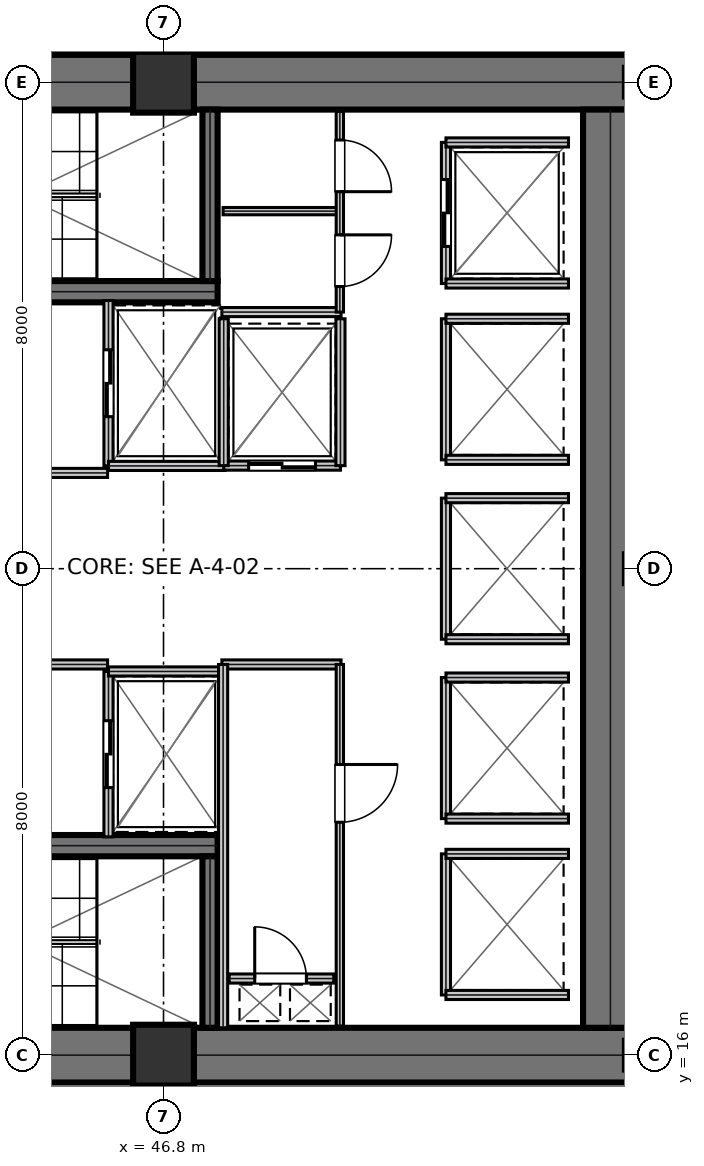
"""IFC4 building model, lengths in metres.
Left out: names, types, materials, properties, quantities, classifications, styles, units other than length and angle.
Written with IfcOpenShell. Run it as: python <this file> out.ifc"""

import sys

from ifc_helpers import new_model, si_unit, direction, frame, frame_2d, origin, origin_2d, place, context, subcontext, project, spatial, rectangle, extrude, element, fill, save


model = new_model("IFC4")
c1 = context("Model", 3, precision=1e-05, world=origin(), true_north=direction((0.0, 1.0)))
c2 = subcontext(c1, "Body", "Model", "MODEL_VIEW")
j1 = project(units=[si_unit("LENGTHUNIT", "METRE"), si_unit("PLANEANGLEUNIT", "RADIAN")], contexts=[c1])
p1 = place(None, origin())
s1 = spatial("IfcSite", under=j1, at=p1, CompositionType="ELEMENT")
p2 = place(p1, origin())
s2 = spatial("IfcBuilding", under=s1, at=p2, CompositionType="ELEMENT")
p3 = place(p2, frame((0.0, 0.0, 5.4)))
s3 = spatial("IfcBuildingStorey", under=s2, at=p3, CompositionType="ELEMENT", Elevation=5.4)
for number, where, z_axis, x_axis in (
    (1, (38.8, 32.0, 0.0), (0.0, 0.0, 1.0), (1.0, 0.0, 0.0)),
    (2, (38.8, 16.0, 0.0), (0.0, 0.0, 1.0), (1.0, 0.0, 0.0)),
):
    element("IfcWall", number, at=place(p3, frame(where, z_axis=z_axis, x_axis=x_axis)), inside=s3, PredefinedType="SHEAR", context=c2, shape_type="SweptSolid", body=[
        extrude(rectangle(XDim=16.0, YDim=0.9, at=frame_2d((8.0, 0.0))), origin(), (0.0, 0.0, 1.0), 5.12),
    ])
p4 = place(p3, frame((54.15, 16.45, 0.0), z_axis=(0.0, 0.0, 1.0), x_axis=(0.0, 1.0, 0.0)))
e3 = element("IfcWall", 3, at=p4, inside=s3, PredefinedType="SHEAR", context=c2, shape_type="SweptSolid", body=[
    extrude(rectangle(XDim=15.1, YDim=0.9, at=frame_2d((7.55, 0.0))), origin(), (0.0, 0.0, 1.0), 5.12),
])
p5 = place(p3, frame((39.98, 28.555, 0.0), z_axis=(0.0, 0.0, 1.0), x_axis=(1.0, 0.0, 0.0)))
e4 = element("IfcWall", 4, at=p5, inside=s3, PredefinedType="SHEAR", context=c2, shape_type="SweptSolid", body=[
    extrude(rectangle(XDim=7.71, YDim=0.35, at=frame_2d((3.855, 0.0))), origin(), (0.0, 0.0, 1.0), 5.12),
])
p6 = place(p5, frame((0.25, 0.0, 0.0)))
e5 = element("IfcOpeningElement", 5, at=p6, cuts=e4, PredefinedType="OPENING", context=c2, shape_type="SweptSolid", body=[
    extrude(rectangle(XDim=1.1, YDim=2.15, at=frame_2d((0.55, 1.075))), frame((0.0, 0.185, 0.0), z_axis=(0.0, -1.0, 0.0), x_axis=(1.0, 0.0, 0.0)), (0.0, 0.0, 1.0), 0.37),
])
p7 = place(p3, frame((39.98, 19.445, 0.0), z_axis=(0.0, 0.0, 1.0), x_axis=(1.0, 0.0, 0.0)))
e6 = element("IfcWall", 6, at=p7, inside=s3, PredefinedType="SHEAR", context=c2, shape_type="SweptSolid", body=[
    extrude(rectangle(XDim=7.71, YDim=0.35, at=frame_2d((3.855, 0.0))), origin(), (0.0, 0.0, 1.0), 5.12),
])
p8 = place(p7, frame((0.25, 0.0, 0.0)))
e7 = element("IfcOpeningElement", 7, at=p8, cuts=e6, PredefinedType="OPENING", context=c2, shape_type="SweptSolid", body=[
    extrude(rectangle(XDim=1.1, YDim=2.15, at=frame_2d((0.55, 1.075))), frame((0.0, 0.185, 0.0), z_axis=(0.0, -1.0, 0.0), x_axis=(1.0, 0.0, 0.0)), (0.0, 0.0, 1.0), 0.37),
])
for number, where, z_axis, x_axis in (
    (8, (47.565, 28.73, 0.0), (0.0, 0.0, 1.0), (0.0, 1.0, 0.0)),
    (9, (47.565, 16.45, 0.0), (0.0, 0.0, 1.0), (0.0, 1.0, 0.0)),
):
    element("IfcWall", number, at=place(p3, frame(where, z_axis=z_axis, x_axis=x_axis)), inside=s3, PredefinedType="SHEAR", context=c2, shape_type="SweptSolid", body=[
        extrude(rectangle(XDim=2.82, YDim=0.25, at=frame_2d((1.41, 0.0))), origin(), (0.0, 0.0, 1.0), 5.12),
    ])
for number, where, z_axis, x_axis in (
    (10, (46.8, 16.0, 0.0), (0.0, 0.0, 1.0), (1.0, 0.0, 0.0)),
    (11, (46.8, 32.0, 0.0), (0.0, 0.0, 1.0), (1.0, 0.0, 0.0)),
):
    element("IfcColumn", number, at=place(p3, frame(where, z_axis=z_axis, x_axis=x_axis)), inside=s3, PredefinedType="COLUMN", context=c2, shape_type="SweptSolid", body=[
        extrude(rectangle(XDim=1.0, YDim=1.0, at=origin_2d()), origin(), (0.0, 0.0, 1.0), 5.395),
    ])
p9 = place(p3, frame((39.98, 25.575, 0.0), z_axis=(0.0, 0.0, 1.0), x_axis=(1.0, 0.0, 0.0)))
e12 = element("IfcWall", 12, at=p9, inside=s3, PredefinedType="PARTITIONING", context=c2, shape_type="SweptSolid", body=[
    extrude(rectangle(XDim=5.9, YDim=0.15, at=frame_2d((2.95, 0.0))), origin(), (0.0, 0.0, 1.0), 5.12),
])
p10 = place(p9, frame((2.35, 0.0, 0.0)))
e13 = element("IfcOpeningElement", 13, at=p10, cuts=e12, PredefinedType="OPENING", context=c2, shape_type="SweptSolid", body=[
    extrude(rectangle(XDim=1.05, YDim=2.15, at=frame_2d((0.525, 1.075))), frame((0.0, 0.085, 0.0), z_axis=(0.0, -1.0, 0.0), x_axis=(1.0, 0.0, 0.0)), (0.0, 0.0, 1.0), 0.17),
])
p11 = place(p3, frame((39.98, 22.425, 0.0), z_axis=(0.0, 0.0, 1.0), x_axis=(1.0, 0.0, 0.0)))
e14 = element("IfcWall", 14, at=p11, inside=s3, PredefinedType="PARTITIONING", context=c2, shape_type="SweptSolid", body=[
    extrude(rectangle(XDim=5.9, YDim=0.15, at=frame_2d((2.95, 0.0))), origin(), (0.0, 0.0, 1.0), 5.12),
])
p12 = place(p11, frame((2.35, 0.0, 0.0)))
e15 = element("IfcOpeningElement", 15, at=p12, cuts=e14, PredefinedType="OPENING", context=c2, shape_type="SweptSolid", body=[
    extrude(rectangle(XDim=1.05, YDim=2.15, at=frame_2d((0.525, 1.075))), frame((0.0, 0.085, 0.0), z_axis=(0.0, -1.0, 0.0), x_axis=(1.0, 0.0, 0.0)), (0.0, 0.0, 1.0), 0.17),
])
p13 = place(p3, frame((45.895, 25.69, 0.0), z_axis=(0.0, 0.0, 1.0), x_axis=(0.0, 1.0, 0.0)))
e16 = element("IfcWall", 16, at=p13, inside=s3, PredefinedType="PARTITIONING", context=c2, shape_type="SweptSolid", body=[
    extrude(rectangle(XDim=2.72, YDim=0.15, at=frame_2d((1.36, 0.0))), origin(), (0.0, 0.0, 1.0), 5.12),
])
p14 = place(p13, frame((0.81, 0.0, 0.0)))
e17 = element("IfcOpeningElement", 17, at=p14, cuts=e16, PredefinedType="OPENING", context=c2, shape_type="SweptSolid", body=[
    extrude(rectangle(XDim=1.1, YDim=2.15, at=frame_2d((0.55, 1.075))), frame((0.0, 0.085, 0.0), z_axis=(0.0, -1.0, 0.0), x_axis=(1.0, 0.0, 0.0)), (0.0, 0.0, 1.0), 0.17),
])
p15 = place(p3, frame((45.895, 25.69, 0.0), z_axis=(0.0, 0.0, 1.0), x_axis=(1.0, 0.0, 0.0)))
e18 = element("IfcWall", 18, at=p15, inside=s3, PredefinedType="PARTITIONING", context=c2, shape_type="SweptSolid", body=[
    extrude(rectangle(XDim=1.915, YDim=0.15, at=frame_2d((0.958, 0.0))), origin(), (0.0, 0.0, 1.0), 5.12),
])
p16 = place(p3, frame((45.895, 19.59, 0.0), z_axis=(0.0, 0.0, 1.0), x_axis=(0.0, 1.0, 0.0)))
e19 = element("IfcWall", 19, at=p16, inside=s3, PredefinedType="PARTITIONING", context=c2, shape_type="SweptSolid", body=[
    extrude(rectangle(XDim=2.72, YDim=0.15, at=frame_2d((1.36, 0.0))), origin(), (0.0, 0.0, 1.0), 5.12),
])
p17 = place(p16, frame((0.81, 0.0, 0.0)))
e20 = element("IfcOpeningElement", 20, at=p17, cuts=e19, PredefinedType="OPENING", context=c2, shape_type="SweptSolid", body=[
    extrude(rectangle(XDim=1.1, YDim=2.15, at=frame_2d((0.55, 1.075))), frame((0.0, 0.085, 0.0), z_axis=(0.0, -1.0, 0.0), x_axis=(1.0, 0.0, 0.0)), (0.0, 0.0, 1.0), 0.17),
])
p18 = place(p3, frame((45.895, 22.31, 0.0), z_axis=(0.0, 0.0, 1.0), x_axis=(1.0, 0.0, 0.0)))
e21 = element("IfcWall", 21, at=p18, inside=s3, PredefinedType="PARTITIONING", context=c2, shape_type="SweptSolid", body=[
    extrude(rectangle(XDim=1.915, YDim=0.15, at=frame_2d((0.958, 0.0))), origin(), (0.0, 0.0, 1.0), 5.12),
])
p19 = place(p3, frame((47.79, 25.695, 0.0), z_axis=(0.0, 0.0, 1.0), x_axis=(1.0, 0.0, 0.0)))
e22 = element("IfcWall", 22, at=p19, inside=s3, PredefinedType="PARTITIONING", context=c2, shape_type="SweptSolid", body=[
    extrude(rectangle(XDim=1.92, YDim=0.15, at=frame_2d((0.96, 0.0))), origin(), (0.0, 0.0, 1.0), 5.12),
])
p20 = place(p19, frame((0.41, 0.0, 0.0)))
e23 = element("IfcOpeningElement", 23, at=p20, cuts=e22, PredefinedType="OPENING", context=c2, shape_type="SweptSolid", body=[
    extrude(rectangle(XDim=1.1, YDim=2.15, at=frame_2d((0.55, 1.075))), frame((0.0, 0.085, 0.0), z_axis=(0.0, -1.0, 0.0), x_axis=(1.0, 0.0, 0.0)), (0.0, 0.0, 1.0), 0.17),
])
for number, where, z_axis, x_axis in (
    (24, (47.79, 25.695, 0.0), (0.0, 0.0, 1.0), (0.0, 1.0, 0.0)),
    (25, (49.71, 25.695, 0.0), (0.0, 0.0, 1.0), (0.0, 1.0, 0.0)),
):
    element("IfcWall", number, at=place(p3, frame(where, z_axis=z_axis, x_axis=x_axis)), inside=s3, PredefinedType="PARTITIONING", context=c2, shape_type="SweptSolid", body=[
        extrude(rectangle(XDim=2.415, YDim=0.15, at=frame_2d((1.208, 0.0))), origin(), (0.0, 0.0, 1.0), 5.12),
    ])
p21 = place(p3, frame((51.445, 28.69, 0.0), z_axis=(0.0, 0.0, 1.0), x_axis=(0.0, 1.0, 0.0)))
e26 = element("IfcWall", 26, at=p21, inside=s3, PredefinedType="PARTITIONING", context=c2, shape_type="SweptSolid", body=[
    extrude(rectangle(XDim=2.32, YDim=0.15, at=frame_2d((1.16, 0.0))), origin(), (0.0, 0.0, 1.0), 5.12),
])
p22 = place(p21, frame((0.61, 0.0, 0.0)))
e27 = element("IfcOpeningElement", 27, at=p22, cuts=e26, PredefinedType="OPENING", context=c2, shape_type="SweptSolid", body=[
    extrude(rectangle(XDim=1.1, YDim=2.15, at=frame_2d((0.55, 1.075))), frame((0.0, 0.085, 0.0), z_axis=(0.0, -1.0, 0.0), x_axis=(1.0, 0.0, 0.0)), (0.0, 0.0, 1.0), 0.17),
])
for number, where, z_axis, x_axis in (
    (28, (51.445, 28.69, 0.0), (0.0, 0.0, 1.0), (1.0, 0.0, 0.0)),
    (29, (51.445, 31.01, 0.0), (0.0, 0.0, 1.0), (1.0, 0.0, 0.0)),
):
    element("IfcWall", number, at=place(p3, frame(where, z_axis=z_axis, x_axis=x_axis)), inside=s3, PredefinedType="PARTITIONING", context=c2, shape_type="SweptSolid", body=[
        extrude(rectangle(XDim=2.015, YDim=0.15, at=frame_2d((1.007, 0.0))), origin(), (0.0, 0.0, 1.0), 5.12),
    ])
p23 = place(p3, frame((51.445, 25.79, 0.0), z_axis=(0.0, 0.0, 1.0), x_axis=(0.0, 1.0, 0.0)))
e30 = element("IfcWall", 30, at=p23, inside=s3, PredefinedType="PARTITIONING", context=c2, shape_type="SweptSolid", body=[
    extrude(rectangle(XDim=2.32, YDim=0.15, at=frame_2d((1.16, 0.0))), origin(), (0.0, 0.0, 1.0), 5.12),
])
for number, where, z_axis, x_axis in (
    (31, (51.445, 25.79, 0.0), (0.0, 0.0, 1.0), (1.0, 0.0, 0.0)),
    (32, (51.445, 28.11, 0.0), (0.0, 0.0, 1.0), (1.0, 0.0, 0.0)),
):
    element("IfcWall", number, at=place(p3, frame(where, z_axis=z_axis, x_axis=x_axis)), inside=s3, PredefinedType="PARTITIONING", context=c2, shape_type="SweptSolid", body=[
        extrude(rectangle(XDim=2.015, YDim=0.15, at=frame_2d((1.007, 0.0))), origin(), (0.0, 0.0, 1.0), 5.12),
    ])
p24 = place(p3, frame((51.445, 19.89, 0.0), z_axis=(0.0, 0.0, 1.0), x_axis=(0.0, 1.0, 0.0)))
e33 = element("IfcWall", 33, at=p24, inside=s3, PredefinedType="PARTITIONING", context=c2, shape_type="SweptSolid", body=[
    extrude(rectangle(XDim=2.32, YDim=0.15, at=frame_2d((1.16, 0.0))), origin(), (0.0, 0.0, 1.0), 5.12),
])
for number, where, z_axis, x_axis in (
    (34, (51.445, 19.89, 0.0), (0.0, 0.0, 1.0), (1.0, 0.0, 0.0)),
    (35, (51.445, 22.21, 0.0), (0.0, 0.0, 1.0), (1.0, 0.0, 0.0)),
):
    element("IfcWall", number, at=place(p3, frame(where, z_axis=z_axis, x_axis=x_axis)), inside=s3, PredefinedType="PARTITIONING", context=c2, shape_type="SweptSolid", body=[
        extrude(rectangle(XDim=2.015, YDim=0.15, at=frame_2d((1.007, 0.0))), origin(), (0.0, 0.0, 1.0), 5.12),
    ])
p25 = place(p3, frame((51.445, 22.84, 0.0), z_axis=(0.0, 0.0, 1.0), x_axis=(0.0, 1.0, 0.0)))
e36 = element("IfcWall", 36, at=p25, inside=s3, PredefinedType="PARTITIONING", context=c2, shape_type="SweptSolid", body=[
    extrude(rectangle(XDim=2.32, YDim=0.15, at=frame_2d((1.16, 0.0))), origin(), (0.0, 0.0, 1.0), 5.12),
])
for number, where, z_axis, x_axis in (
    (37, (51.445, 22.84, 0.0), (0.0, 0.0, 1.0), (1.0, 0.0, 0.0)),
    (38, (51.445, 25.16, 0.0), (0.0, 0.0, 1.0), (1.0, 0.0, 0.0)),
):
    element("IfcWall", number, at=place(p3, frame(where, z_axis=z_axis, x_axis=x_axis)), inside=s3, PredefinedType="PARTITIONING", context=c2, shape_type="SweptSolid", body=[
        extrude(rectangle(XDim=2.015, YDim=0.15, at=frame_2d((1.007, 0.0))), origin(), (0.0, 0.0, 1.0), 5.12),
    ])
p26 = place(p3, frame((51.445, 16.99, 0.0), z_axis=(0.0, 0.0, 1.0), x_axis=(0.0, 1.0, 0.0)))
e39 = element("IfcWall", 39, at=p26, inside=s3, PredefinedType="PARTITIONING", context=c2, shape_type="SweptSolid", body=[
    extrude(rectangle(XDim=2.32, YDim=0.15, at=frame_2d((1.16, 0.0))), origin(), (0.0, 0.0, 1.0), 5.12),
])
for number, where, z_axis, x_axis in (
    (40, (51.445, 16.99, 0.0), (0.0, 0.0, 1.0), (1.0, 0.0, 0.0)),
    (41, (51.445, 19.31, 0.0), (0.0, 0.0, 1.0), (1.0, 0.0, 0.0)),
):
    element("IfcWall", number, at=place(p3, frame(where, z_axis=z_axis, x_axis=x_axis)), inside=s3, PredefinedType="PARTITIONING", context=c2, shape_type="SweptSolid", body=[
        extrude(rectangle(XDim=2.015, YDim=0.15, at=frame_2d((1.007, 0.0))), origin(), (0.0, 0.0, 1.0), 5.12),
    ])
p27 = place(p3, frame((47.88, 17.26, 0.0), z_axis=(0.0, 0.0, 1.0), x_axis=(1.0, 0.0, 0.0)))
e42 = element("IfcWall", 42, at=p27, inside=s3, PredefinedType="PARTITIONING", context=c2, shape_type="SweptSolid", body=[
    extrude(rectangle(XDim=1.72, YDim=0.15, at=frame_2d((0.86, 0.0))), origin(), (0.0, 0.0, 1.0), 5.12),
])
p28 = place(p27, frame((0.42, 0.0, 0.0)))
e43 = element("IfcOpeningElement", 43, at=p28, cuts=e42, PredefinedType="OPENING", context=c2, shape_type="SweptSolid", body=[
    extrude(rectangle(XDim=0.85, YDim=2.15, at=frame_2d((0.425, 1.075))), frame((0.0, 0.085, 0.0), z_axis=(0.0, -1.0, 0.0), x_axis=(1.0, 0.0, 0.0)), (0.0, 0.0, 1.0), 0.17),
])
p29 = place(p3, frame((47.76, 22.425, 0.0), z_axis=(0.0, 0.0, 1.0), x_axis=(1.0, 0.0, 0.0)))
e44 = element("IfcWall", 44, at=p29, inside=s3, PredefinedType="PARTITIONING", context=c2, shape_type="SweptSolid", body=[
    extrude(rectangle(XDim=1.96, YDim=0.15, at=frame_2d((0.98, 0.0))), origin(), (0.0, 0.0, 1.0), 5.12),
])
p30 = place(p3, frame((47.78, 16.45, 0.0), z_axis=(0.0, 0.0, 1.0), x_axis=(0.0, 1.0, 0.0)))
e45 = element("IfcWall", 45, at=p30, inside=s3, PredefinedType="PARTITIONING", context=c2, shape_type="SweptSolid", body=[
    extrude(rectangle(XDim=5.975, YDim=0.15, at=frame_2d((2.988, 0.0))), origin(), (0.0, 0.0, 1.0), 5.12),
])
p31 = place(p3, frame((49.7, 16.48, 0.0), z_axis=(0.0, 0.0, 1.0), x_axis=(0.0, 1.0, 0.0)))
e46 = element("IfcWall", 46, at=p31, inside=s3, PredefinedType="PARTITIONING", context=c2, shape_type="SweptSolid", body=[
    extrude(rectangle(XDim=5.945, YDim=0.12, at=frame_2d((2.973, 0.0))), origin(), (0.0, 0.0, 1.0), 5.12),
])
p32 = place(p31, frame((3.35, 0.0, 0.0)))
e47 = element("IfcOpeningElement", 47, at=p32, cuts=e46, PredefinedType="OPENING", context=c2, shape_type="SweptSolid", body=[
    extrude(rectangle(XDim=0.95, YDim=2.15, at=frame_2d((0.475, 1.075))), frame((0.0, 0.07, 0.0), z_axis=(0.0, -1.0, 0.0), x_axis=(1.0, 0.0, 0.0)), (0.0, 0.0, 1.0), 0.14),
])
p33 = place(p3, frame((47.76, 28.22, 0.0), z_axis=(0.0, 0.0, 1.0), x_axis=(1.0, 0.0, 0.0)))
e48 = element("IfcWall", 48, at=p33, inside=s3, PredefinedType="PARTITIONING", context=c2, shape_type="SweptSolid", body=[
    extrude(rectangle(XDim=1.96, YDim=0.15, at=frame_2d((0.98, 0.0))), origin(), (0.0, 0.0, 1.0), 5.12),
])
p34 = place(p3, frame((47.78, 29.88, 0.0), z_axis=(0.0, 0.0, 1.0), x_axis=(1.0, 0.0, 0.0)))
e49 = element("IfcWall", 49, at=p34, inside=s3, PredefinedType="PARTITIONING", context=c2, shape_type="SweptSolid", body=[
    extrude(rectangle(XDim=1.92, YDim=0.12, at=frame_2d((0.96, 0.0))), origin(), (0.0, 0.0, 1.0), 5.12),
])
p35 = place(p3, frame((49.7, 28.22, 0.0), z_axis=(0.0, 0.0, 1.0), x_axis=(0.0, 1.0, 0.0)))
e50 = element("IfcWall", 50, at=p35, inside=s3, PredefinedType="PARTITIONING", context=c2, shape_type="SweptSolid", body=[
    extrude(rectangle(XDim=3.3, YDim=0.12, at=frame_2d((1.65, 0.0))), origin(), (0.0, 0.0, 1.0), 5.12),
])
p36 = place(p35, frame((0.42, 0.0, 0.0)))
e51 = element("IfcOpeningElement", 51, at=p36, cuts=e50, PredefinedType="OPENING", context=c2, shape_type="SweptSolid", body=[
    extrude(rectangle(XDim=0.85, YDim=2.15, at=frame_2d((0.425, 1.075))), frame((0.0, 0.07, 0.0), z_axis=(0.0, -1.0, 0.0), x_axis=(1.0, 0.0, 0.0)), (0.0, 0.0, 1.0), 0.14),
])
p37 = place(p35, frame((1.98, 0.0, 0.0)))
e52 = element("IfcOpeningElement", 52, at=p37, cuts=e50, PredefinedType="OPENING", context=c2, shape_type="SweptSolid", body=[
    extrude(rectangle(XDim=0.85, YDim=2.15, at=frame_2d((0.425, 1.075))), frame((0.0, 0.07, 0.0), z_axis=(0.0, -1.0, 0.0), x_axis=(1.0, 0.0, 0.0)), (0.0, 0.0, 1.0), 0.14),
])
p38 = place(p3, frame((46.8, 32.4, 0.0), z_axis=(0.0, 0.0, 1.0), x_axis=(0.0, 1.0, 0.0)))
e53 = element("IfcWall", 53, at=p38, inside=s3, PredefinedType="PARTITIONING", context=c2, shape_type="SweptSolid", body=[
    extrude(rectangle(XDim=1.9, YDim=0.12, at=frame_2d((0.95, 0.0))), origin(), (0.0, 0.0, 1.0), 5.12),
])
p39 = place(p14, frame((1.1, 0.0, 0.0), z_axis=(0.0, 0.0, 1.0), x_axis=(-1.0, 0.0, 0.0)))
e54 = element("IfcDoor", 54, at=p39, inside=s3, OperationType="DOUBLE_DOOR_SLIDING", PredefinedType="DOOR", context=c2, shape_type="SweptSolid", body=[
    extrude(rectangle(XDim=1.1, YDim=2.15, at=frame_2d((0.55, 1.075))), frame((0.0, 0.025, 0.0), z_axis=(0.0, -1.0, 0.0), x_axis=(1.0, 0.0, 0.0)), (0.0, 0.0, 1.0), 0.05),
])
fill(e17, e54)
p40 = place(p17, frame((1.1, 0.0, 0.0), z_axis=(0.0, 0.0, 1.0), x_axis=(-1.0, 0.0, 0.0)))
e55 = element("IfcDoor", 55, at=p40, inside=s3, OperationType="DOUBLE_DOOR_SLIDING", PredefinedType="DOOR", context=c2, shape_type="SweptSolid", body=[
    extrude(rectangle(XDim=1.1, YDim=2.15, at=frame_2d((0.55, 1.075))), frame((0.0, 0.025, 0.0), z_axis=(0.0, -1.0, 0.0), x_axis=(1.0, 0.0, 0.0)), (0.0, 0.0, 1.0), 0.05),
])
fill(e20, e55)
p41 = place(p20, frame((1.1, 0.0, 0.0), z_axis=(0.0, 0.0, 1.0), x_axis=(-1.0, 0.0, 0.0)))
e56 = element("IfcDoor", 56, at=p41, inside=s3, OperationType="DOUBLE_DOOR_SLIDING", PredefinedType="DOOR", context=c2, shape_type="SweptSolid", body=[
    extrude(rectangle(XDim=1.1, YDim=2.15, at=frame_2d((0.55, 1.075))), frame((0.0, 0.025, 0.0), z_axis=(0.0, -1.0, 0.0), x_axis=(1.0, 0.0, 0.0)), (0.0, 0.0, 1.0), 0.05),
])
fill(e23, e56)
p42 = place(p22, frame((1.1, 0.0, 0.0), z_axis=(0.0, 0.0, 1.0), x_axis=(-1.0, 0.0, 0.0)))
e57 = element("IfcDoor", 57, at=p42, inside=s3, OperationType="DOUBLE_DOOR_SLIDING", PredefinedType="DOOR", context=c2, shape_type="SweptSolid", body=[
    extrude(rectangle(XDim=1.1, YDim=2.15, at=frame_2d((0.55, 1.075))), frame((0.0, 0.025, 0.0), z_axis=(0.0, -1.0, 0.0), x_axis=(1.0, 0.0, 0.0)), (0.0, 0.0, 1.0), 0.05),
])
fill(e27, e57)
p43 = place(p28, origin())
e58 = element("IfcDoor", 58, at=p43, inside=s3, OperationType="SINGLE_SWING_LEFT", PredefinedType="TRAPDOOR", context=c2, shape_type="SweptSolid", body=[
    extrude(rectangle(XDim=0.85, YDim=2.15, at=frame_2d((0.425, 1.075))), frame((0.0, 0.025, 0.0), z_axis=(0.0, -1.0, 0.0), x_axis=(1.0, 0.0, 0.0)), (0.0, 0.0, 1.0), 0.05),
])
fill(e43, e58)
p44 = place(p32, frame((0.95, 0.0, 0.0), z_axis=(0.0, 0.0, 1.0), x_axis=(-1.0, 0.0, 0.0)))
e59 = element("IfcDoor", 59, at=p44, inside=s3, OperationType="SINGLE_SWING_LEFT", PredefinedType="DOOR", context=c2, shape_type="SweptSolid", body=[
    extrude(rectangle(XDim=0.95, YDim=2.15, at=frame_2d((0.475, 1.075))), frame((0.0, 0.025, 0.0), z_axis=(0.0, -1.0, 0.0), x_axis=(1.0, 0.0, 0.0)), (0.0, 0.0, 1.0), 0.05),
])
fill(e47, e59)
p45 = place(p36, frame((0.85, 0.0, 0.0), z_axis=(0.0, 0.0, 1.0), x_axis=(-1.0, 0.0, 0.0)))
e60 = element("IfcDoor", 60, at=p45, inside=s3, OperationType="SINGLE_SWING_LEFT", PredefinedType="DOOR", context=c2, shape_type="SweptSolid", body=[
    extrude(rectangle(XDim=0.85, YDim=2.15, at=frame_2d((0.425, 1.075))), frame((0.0, 0.025, 0.0), z_axis=(0.0, -1.0, 0.0), x_axis=(1.0, 0.0, 0.0)), (0.0, 0.0, 1.0), 0.05),
])
fill(e51, e60)
p46 = place(p37, frame((0.85, 0.0, 0.0), z_axis=(0.0, 0.0, 1.0), x_axis=(-1.0, 0.0, 0.0)))
e61 = element("IfcDoor", 61, at=p46, inside=s3, OperationType="SINGLE_SWING_RIGHT", PredefinedType="DOOR", context=c2, shape_type="SweptSolid", body=[
    extrude(rectangle(XDim=0.85, YDim=2.15, at=frame_2d((0.425, 1.075))), frame((0.0, 0.025, 0.0), z_axis=(0.0, -1.0, 0.0), x_axis=(1.0, 0.0, 0.0)), (0.0, 0.0, 1.0), 0.05),
])
fill(e52, e61)
save(model, sys.argv[1])
